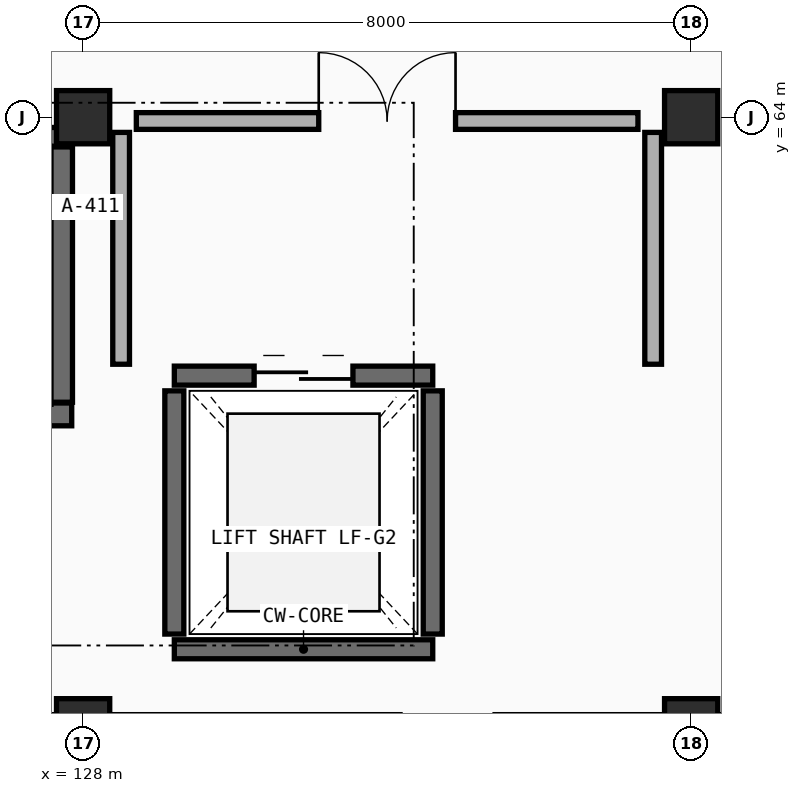
"""IFC4 building model, lengths in metres.
Left out: names, types, materials, properties, quantities, classifications, styles, units other than length and angle.
Written with IfcOpenShell. Run it as: python <this file> out.ifc"""

import sys

from ifc_helpers import new_model, si_unit, direction, frame, frame_2d, origin, origin_2d, place, context, subcontext, project, spatial, rectangle, extrude, element, fill, save


model = new_model("IFC4")
c1 = context("Model", 3, precision=1e-05, world=origin(), true_north=direction((0.0, 1.0)))
c2 = subcontext(c1, "Body", "Model", "MODEL_VIEW")
j1 = project(units=[si_unit("LENGTHUNIT", "METRE"), si_unit("PLANEANGLEUNIT", "RADIAN")], contexts=[c1])
p1 = place(None, origin())
s1 = spatial("IfcSite", under=j1, at=p1, CompositionType="ELEMENT")
p2 = place(p1, origin())
s2 = spatial("IfcBuilding", under=s1, at=p2, CompositionType="ELEMENT")
p3 = place(p2, frame((0.0, 0.0, 9.6)))
s3 = spatial("IfcBuildingStorey", under=s2, at=p3, CompositionType="ELEMENT", Elevation=9.6)
for number, where, z_axis, x_axis in (
    (1, (128.0, 56.0, 0.0), (0.0, 0.0, 1.0), (1.0, 0.0, 0.0)),
    (2, (136.0, 56.0, 0.0), (0.0, 0.0, 1.0), (1.0, 0.0, 0.0)),
    (3, (128.0, 64.0, 0.0), (0.0, 0.0, 1.0), (1.0, 0.0, 0.0)),
    (4, (136.0, 64.0, 0.0), (0.0, 0.0, 1.0), (1.0, 0.0, 0.0)),
):
    element("IfcColumn", number, at=place(p3, frame(where, z_axis=z_axis, x_axis=x_axis)), inside=s3, PredefinedType="COLUMN", context=c2, shape_type="SweptSolid", body=[
        extrude(rectangle(XDim=0.7, YDim=0.7, at=origin_2d()), origin(), (0.0, 0.0, 1.0), 4.2),
    ])
p4 = place(p3, frame((120.2, 60.09, 0.0), z_axis=(0.0, 0.0, 1.0), x_axis=(1.0, 0.0, 0.0)))
e5 = element("IfcWall", 5, at=p4, inside=s3, PredefinedType="SHEAR", context=c2, shape_type="SweptSolid", body=[
    extrude(rectangle(XDim=7.65, YDim=0.3, at=frame_2d((3.825, 0.0))), origin(), (0.0, 0.0, 1.0), 4.2),
])
p5 = place(p3, frame((127.71, 60.25, 0.0), z_axis=(0.0, 0.0, 1.0), x_axis=(0.0, 1.0, 0.0)))
e6 = element("IfcWall", 6, at=p5, inside=s3, PredefinedType="SHEAR", context=c2, shape_type="SweptSolid", body=[
    extrude(rectangle(XDim=3.36, YDim=0.3, at=frame_2d((1.68, 0.0))), origin(), (0.0, 0.0, 1.0), 4.2),
])
p6 = place(p3, frame((120.2, 63.74, 0.0), z_axis=(0.0, 0.0, 1.0), x_axis=(1.0, 0.0, 0.0)))
e7 = element("IfcWall", 7, at=p6, inside=s3, PredefinedType="SOLIDWALL", context=c2, shape_type="SweptSolid", body=[
    extrude(rectangle(XDim=7.65, YDim=0.25, at=frame_2d((3.825, 0.0))), origin(), (0.0, 0.0, 1.0), 4.2),
])
p7 = place(p6, frame((0.65, 0.0, 0.0)))
e8 = element("IfcOpeningElement", 8, at=p7, cuts=e7, PredefinedType="OPENING", context=c2, shape_type="SweptSolid", body=[
    extrude(rectangle(XDim=1.25, YDim=2.15, at=frame_2d((0.625, 1.075))), frame((0.0, 0.135, 0.0), z_axis=(0.0, -1.0, 0.0), x_axis=(1.0, 0.0, 0.0)), (0.0, 0.0, 1.0), 0.27),
])
p8 = place(p3, frame((129.2, 57.0, 0.0), z_axis=(0.0, 0.0, 1.0), x_axis=(1.0, 0.0, 0.0)))
e9 = element("IfcWall", 9, at=p8, inside=s3, PredefinedType="SOLIDWALL", context=c2, shape_type="SweptSolid", body=[
    extrude(rectangle(XDim=3.4, YDim=0.25, at=frame_2d((1.7, 0.0))), origin(), (0.0, 0.0, 1.0), 4.2),
])
p9 = place(p3, frame((129.2, 60.6, 0.0), z_axis=(0.0, 0.0, 1.0), x_axis=(1.0, 0.0, 0.0)))
e10 = element("IfcWall", 10, at=p9, inside=s3, PredefinedType="SOLIDWALL", context=c2, shape_type="SweptSolid", body=[
    extrude(rectangle(XDim=3.4, YDim=0.25, at=frame_2d((1.7, 0.0))), origin(), (0.0, 0.0, 1.0), 4.2),
])
p10 = place(p9, frame((1.05, 0.0, 0.0)))
e11 = element("IfcOpeningElement", 11, at=p10, cuts=e10, PredefinedType="OPENING", context=c2, shape_type="SweptSolid", body=[
    extrude(rectangle(XDim=1.3, YDim=2.2, at=frame_2d((0.65, 1.1))), frame((0.0, 0.135, 0.0), z_axis=(0.0, -1.0, 0.0), x_axis=(1.0, 0.0, 0.0)), (0.0, 0.0, 1.0), 0.27),
])
for number, where, z_axis, x_axis in (
    (12, (129.2, 57.2, 0.0), (0.0, 0.0, 1.0), (0.0, 1.0, 0.0)),
    (13, (132.6, 57.2, 0.0), (0.0, 0.0, 1.0), (0.0, 1.0, 0.0)),
):
    element("IfcWall", number, at=place(p3, frame(where, z_axis=z_axis, x_axis=x_axis)), inside=s3, PredefinedType="SOLIDWALL", context=c2, shape_type="SweptSolid", body=[
        extrude(rectangle(XDim=3.2, YDim=0.25, at=frame_2d((1.6, 0.0))), origin(), (0.0, 0.0, 1.0), 4.2),
    ])
p11 = place(p3, frame((128.7, 63.95, 0.0), z_axis=(0.0, 0.0, 1.0), x_axis=(1.0, 0.0, 0.0)))
e14 = element("IfcWall", 14, at=p11, inside=s3, PredefinedType="PARTITIONING", context=c2, shape_type="SweptSolid", body=[
    extrude(rectangle(XDim=6.6, YDim=0.22, at=frame_2d((3.3, 0.0))), origin(), (0.0, 0.0, 1.0), 3.275),
])
p12 = place(p11, frame((2.4, 0.0, 0.0)))
e15 = element("IfcOpeningElement", 15, at=p12, cuts=e14, PredefinedType="OPENING", context=c2, shape_type="SweptSolid", body=[
    extrude(rectangle(XDim=1.8, YDim=2.2, at=frame_2d((0.9, 1.1))), frame((0.0, 0.12, 0.0), z_axis=(0.0, -1.0, 0.0), x_axis=(1.0, 0.0, 0.0)), (0.0, 0.0, 1.0), 0.24),
])
for number, where, z_axis, x_axis in (
    (16, (128.5, 60.75, 0.0), (0.0, 0.0, 1.0), (0.0, 1.0, 0.0)),
    (17, (135.5, 60.75, 0.0), (0.0, 0.0, 1.0), (0.0, 1.0, 0.0)),
):
    element("IfcWall", number, at=place(p3, frame(where, z_axis=z_axis, x_axis=x_axis)), inside=s3, PredefinedType="PARTITIONING", context=c2, shape_type="SweptSolid", body=[
        extrude(rectangle(XDim=3.05, YDim=0.22, at=frame_2d((1.525, 0.0))), origin(), (0.0, 0.0, 1.0), 3.225),
    ])
p13 = place(p10, origin())
e18 = element("IfcDoor", 18, at=p13, inside=s3, OperationType="DOUBLE_DOOR_SLIDING", PredefinedType="DOOR", context=c2, shape_type="SweptSolid", body=[
    extrude(rectangle(XDim=1.3, YDim=2.2, at=frame_2d((0.65, 1.1))), frame((0.0, 0.025, 0.0), z_axis=(0.0, -1.0, 0.0), x_axis=(1.0, 0.0, 0.0)), (0.0, 0.0, 1.0), 0.05),
])
fill(e11, e18)
p14 = place(p12, origin())
e19 = element("IfcDoor", 19, at=p14, inside=s3, OperationType="DOUBLE_DOOR_SINGLE_SWING", PredefinedType="DOOR", context=c2, shape_type="SweptSolid", body=[
    extrude(rectangle(XDim=1.8, YDim=2.2, at=frame_2d((0.9, 1.1))), frame((0.0, 0.025, 0.0), z_axis=(0.0, -1.0, 0.0), x_axis=(1.0, 0.0, 0.0)), (0.0, 0.0, 1.0), 0.05),
])
fill(e15, e19)
save(model, sys.argv[1])
